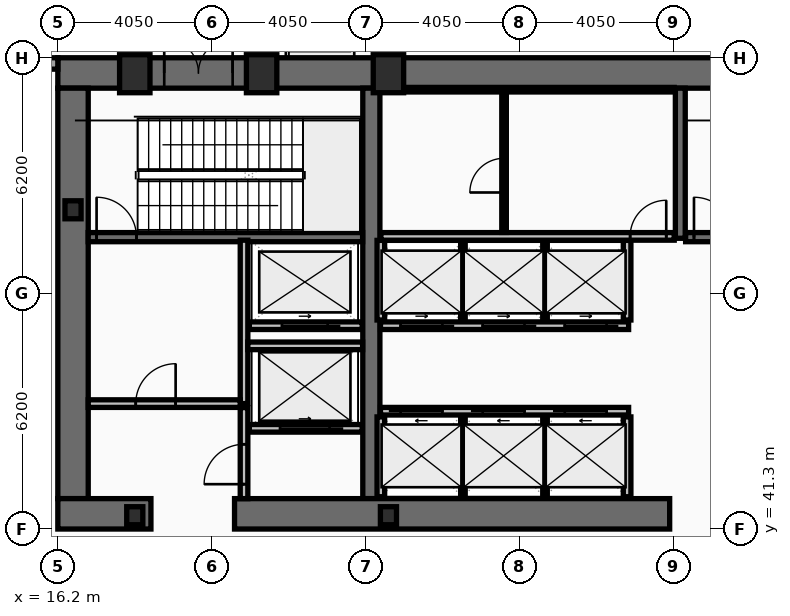
"""IFC4 building model, lengths in metres.
Left out: names, types, materials, properties, quantities, classifications, styles, units other than length and angle.
Written with IfcOpenShell. Run it as: python <this file> out.ifc"""

import sys

from ifc_helpers import new_model, si_unit, direction, frame, frame_2d, origin, origin_2d, place, context, subcontext, project, spatial, rectangle, hollow_rectangle, i_section, extrude, element, fill, save


model = new_model("IFC4")
c1 = context("Model", 3, precision=1e-05, world=origin(), true_north=direction((0.0, 1.0)))
c2 = subcontext(c1, "Body", "Model", "MODEL_VIEW")
j1 = project(units=[si_unit("LENGTHUNIT", "METRE"), si_unit("PLANEANGLEUNIT", "RADIAN")], contexts=[c1])
p1 = place(None, origin())
s1 = spatial("IfcSite", under=j1, at=p1, CompositionType="ELEMENT")
p2 = place(p1, origin())
s2 = spatial("IfcBuilding", under=s1, at=p2, CompositionType="ELEMENT")
p3 = place(p2, origin())
s3 = spatial("IfcBuildingStorey", under=s2, at=p3, CompositionType="ELEMENT", Elevation=0.0)
p4 = place(p3, frame((16.2, 53.3, 0.0), z_axis=(0.0, 0.0, 1.0), x_axis=(1.0, 0.0, 0.0)))
e1 = element("IfcWall", 1, at=p4, inside=s3, PredefinedType="SHEAR", context=c2, shape_type="SweptSolid", body=[
    extrude(rectangle(XDim=40.5, YDim=0.8, at=frame_2d((20.25, 0.0))), origin(), (0.0, 0.0, 1.0), 5.2),
])
p5 = place(p4, frame((2.8, 0.0, 0.0)))
e2 = element("IfcOpeningElement", 2, at=p5, cuts=e1, PredefinedType="OPENING", context=c2, shape_type="SweptSolid", body=[
    extrude(rectangle(XDim=1.8, YDim=2.4, at=frame_2d((0.9, 1.2))), frame((0.0, 0.41, 0.0), z_axis=(0.0, -1.0, 0.0), x_axis=(1.0, 0.0, 0.0)), (0.0, 0.0, 1.0), 0.82),
])
p6 = place(p4, frame((19.3, 0.0, 0.0)))
e3 = element("IfcOpeningElement", 3, at=p6, cuts=e1, PredefinedType="OPENING", context=c2, shape_type="SweptSolid", body=[
    extrude(rectangle(XDim=1.8, YDim=2.4, at=frame_2d((0.9, 1.2))), frame((0.0, 0.41, 0.0), z_axis=(0.0, -1.0, 0.0), x_axis=(1.0, 0.0, 0.0)), (0.0, 0.0, 1.0), 0.82),
])
p7 = place(p4, frame((35.9, 0.0, 0.0)))
e4 = element("IfcOpeningElement", 4, at=p7, cuts=e1, PredefinedType="OPENING", context=c2, shape_type="SweptSolid", body=[
    extrude(rectangle(XDim=1.8, YDim=2.4, at=frame_2d((0.9, 1.2))), frame((0.0, 0.41, 0.0), z_axis=(0.0, -1.0, 0.0), x_axis=(1.0, 0.0, 0.0)), (0.0, 0.0, 1.0), 0.82),
])
p8 = place(p3, frame((16.6, 42.1, 0.0), z_axis=(0.0, 0.0, 1.0), x_axis=(0.0, 1.0, 0.0)))
e5 = element("IfcWall", 5, at=p8, inside=s3, PredefinedType="SHEAR", context=c2, shape_type="SweptSolid", body=[
    extrude(rectangle(XDim=10.8, YDim=0.8, at=frame_2d((5.4, 0.0))), origin(), (0.0, 0.0, 1.0), 5.2),
])
p9 = place(p3, frame((24.45, 42.1, 0.0), z_axis=(0.0, 0.0, 1.0), x_axis=(0.0, 1.0, 0.0)))
e6 = element("IfcWall", 6, at=p9, inside=s3, PredefinedType="SHEAR", context=c2, shape_type="SweptSolid", body=[
    extrude(rectangle(XDim=10.8, YDim=0.45, at=frame_2d((5.4, 0.0))), origin(), (0.0, 0.0, 1.0), 5.2),
])
p10 = place(p3, frame((18.65, 41.7, 0.0), z_axis=(0.0, 0.0, 1.0), x_axis=(-1.0, 0.0, 0.0)))
e7 = element("IfcWall", 7, at=p10, inside=s3, PredefinedType="SHEAR", context=c2, shape_type="SweptSolid", body=[
    extrude(rectangle(XDim=2.45, YDim=0.8, at=frame_2d((1.225, 0.0))), origin(), (0.0, 0.0, 1.0), 5.2),
])
p11 = place(p3, frame((32.3, 41.7, 0.0), z_axis=(0.0, 0.0, 1.0), x_axis=(-1.0, 0.0, 0.0)))
e8 = element("IfcWall", 8, at=p11, inside=s3, PredefinedType="SHEAR", context=c2, shape_type="SweptSolid", body=[
    extrude(rectangle(XDim=11.45, YDim=0.8, at=frame_2d((5.725, 0.0))), origin(), (0.0, 0.0, 1.0), 5.2),
])
p12 = place(p3, frame((32.58, 48.95, 0.0), z_axis=(0.0, 0.0, 1.0), x_axis=(0.0, 1.0, 0.0)))
e9 = element("IfcWall", 9, at=p12, inside=s3, PredefinedType="SHEAR", context=c2, shape_type="SweptSolid", body=[
    extrude(rectangle(XDim=3.95, YDim=0.26, at=frame_2d((1.975, 0.0))), origin(), (0.0, 0.0, 1.0), 5.2),
])
p13 = place(p3, frame((17.0, 48.98, 0.0), z_axis=(0.0, 0.0, 1.0), x_axis=(1.0, 0.0, 0.0)))
e10 = element("IfcWall", 10, at=p13, inside=s3, PredefinedType="SHEAR", context=c2, shape_type="SweptSolid", body=[
    extrude(rectangle(XDim=7.22, YDim=0.24, at=frame_2d((3.61, 0.0))), origin(), (0.0, 0.0, 1.0), 5.2),
])
p14 = place(p13, frame((0.22, 0.0, 0.0)))
e11 = element("IfcOpeningElement", 11, at=p14, cuts=e10, PredefinedType="OPENING", context=c2, shape_type="SweptSolid", body=[
    extrude(rectangle(XDim=1.05, YDim=2.15, at=frame_2d((0.525, 1.075))), frame((0.0, 0.13, 0.0), z_axis=(0.0, -1.0, 0.0), x_axis=(1.0, 0.0, 0.0)), (0.0, 0.0, 1.0), 0.26),
])
p15 = place(p3, frame((32.72, 48.98, 0.0), z_axis=(0.0, 0.0, 1.0), x_axis=(1.0, 0.0, 0.0)))
e12 = element("IfcWall", 12, at=p15, inside=s3, PredefinedType="SHEAR", context=c2, shape_type="SweptSolid", body=[
    extrude(rectangle(XDim=7.56, YDim=0.24, at=frame_2d((3.78, 0.0))), origin(), (0.0, 0.0, 1.0), 5.2),
])
p16 = place(p15, frame((0.22, 0.0, 0.0)))
e13 = element("IfcOpeningElement", 13, at=p16, cuts=e12, PredefinedType="OPENING", context=c2, shape_type="SweptSolid", body=[
    extrude(rectangle(XDim=1.05, YDim=2.15, at=frame_2d((0.525, 1.075))), frame((0.0, 0.13, 0.0), z_axis=(0.0, -1.0, 0.0), x_axis=(1.0, 0.0, 0.0)), (0.0, 0.0, 1.0), 0.26),
])
for number, where, z_axis, x_axis in (
    (14, (18.225, 53.28, 0.0), (0.0, 0.0, 1.0), (1.0, 0.0, 0.0)),
    (15, (21.562, 53.28, 0.0), (0.0, 0.0, 1.0), (1.0, 0.0, 0.0)),
    (16, (24.9, 53.28, 0.0), (0.0, 0.0, 1.0), (1.0, 0.0, 0.0)),
):
    element("IfcColumn", number, at=place(p3, frame(where, z_axis=z_axis, x_axis=x_axis)), inside=s3, PredefinedType="COLUMN", context=c2, shape_type="SweptSolid", body=[
        extrude(hollow_rectangle(XDim=0.8, YDim=1.0, WallThickness=0.055, at=origin_2d()), origin(), (0.0, 0.0, 1.0), 5.4),
    ])
for number, where, z_axis, x_axis in (
    (17, (16.6, 49.7, 0.0), (0.0, 0.0, 1.0), (1.0, 0.0, 0.0)),
    (18, (18.225, 41.65, 0.0), (0.0, 0.0, 1.0), (1.0, 0.0, 0.0)),
    (19, (24.9, 41.65, 0.0), (0.0, 0.0, 1.0), (1.0, 0.0, 0.0)),
):
    element("IfcColumn", number, at=place(p3, frame(where, z_axis=z_axis, x_axis=x_axis)), inside=s3, PredefinedType="COLUMN", context=c2, shape_type="SweptSolid", body=[
        extrude(i_section(OverallWidth=0.424, OverallDepth=0.474, WebThickness=0.048, FlangeThickness=0.077, at=origin_2d()), origin(), (0.0, 0.0, 1.0), 5.4),
    ])
p17 = place(p3, frame((3.875, 53.55, 0.0), z_axis=(0.0, 0.0, 1.0), x_axis=(1.0, 0.0, 0.0)))
e20 = element("IfcWall", 20, at=p17, inside=s3, PredefinedType="SOLIDWALL", context=c2, shape_type="SweptSolid", body=[
    extrude(rectangle(XDim=12.325, YDim=0.3, at=frame_2d((6.163, 0.0))), origin(), (0.0, 0.0, 1.0), 4.54),
])
p18 = place(p17, frame((8.675, 0.0, 0.0)))
e21 = element("IfcOpeningElement", 21, at=p18, cuts=e20, PredefinedType="OPENING", context=c2, shape_type="SweptSolid", body=[
    extrude(rectangle(XDim=1.8, YDim=2.4, at=frame_2d((0.9, 1.2))), frame((0.0, 0.16, 0.0), z_axis=(0.0, -1.0, 0.0), x_axis=(1.0, 0.0, 0.0)), (0.0, 0.0, 1.0), 0.32),
])
p19 = place(p17, frame((2.475, 0.0, 1.0)))
e22 = element("IfcOpeningElement", 22, at=p19, cuts=e20, PredefinedType="OPENING", context=c2, shape_type="SweptSolid", body=[
    extrude(rectangle(XDim=1.2, YDim=2.8, at=frame_2d((0.6, 1.4))), frame((0.0, 0.16, 0.0), z_axis=(0.0, -1.0, 0.0), x_axis=(1.0, 0.0, 0.0)), (0.0, 0.0, 1.0), 0.32),
])
p20 = place(p3, frame((24.69, 44.4, 0.0), z_axis=(0.0, 0.0, 1.0), x_axis=(1.0, 0.0, 0.0)))
e23 = element("IfcWall", 23, at=p20, inside=s3, PredefinedType="PARTITIONING", context=c2, shape_type="SweptSolid", body=[
    extrude(rectangle(XDim=6.53, YDim=0.2, at=frame_2d((3.265, 0.0))), origin(), (0.0, 0.0, 1.0), 5.2),
])
p21 = place(p20, frame((0.53, 0.0, 0.0)))
e24 = element("IfcOpeningElement", 24, at=p21, cuts=e23, PredefinedType="OPENING", context=c2, shape_type="SweptSolid", body=[
    extrude(rectangle(XDim=1.1, YDim=2.18, at=frame_2d((0.55, 1.09))), frame((0.0, 0.11, 0.0), z_axis=(0.0, -1.0, 0.0), x_axis=(1.0, 0.0, 0.0)), (0.0, 0.0, 1.0), 0.22),
])
p22 = place(p20, frame((2.69, 0.0, 0.0)))
e25 = element("IfcOpeningElement", 25, at=p22, cuts=e23, PredefinedType="OPENING", context=c2, shape_type="SweptSolid", body=[
    extrude(rectangle(XDim=1.1, YDim=2.18, at=frame_2d((0.55, 1.09))), frame((0.0, 0.11, 0.0), z_axis=(0.0, -1.0, 0.0), x_axis=(1.0, 0.0, 0.0)), (0.0, 0.0, 1.0), 0.22),
])
p23 = place(p20, frame((4.85, 0.0, 0.0)))
e26 = element("IfcOpeningElement", 26, at=p23, cuts=e23, PredefinedType="OPENING", context=c2, shape_type="SweptSolid", body=[
    extrude(rectangle(XDim=1.1, YDim=2.18, at=frame_2d((0.55, 1.09))), frame((0.0, 0.11, 0.0), z_axis=(0.0, -1.0, 0.0), x_axis=(1.0, 0.0, 0.0)), (0.0, 0.0, 1.0), 0.22),
])
p24 = place(p3, frame((24.21, 43.95, 0.0), z_axis=(0.0, 0.0, 1.0), x_axis=(-1.0, 0.0, 0.0)))
e27 = element("IfcWall", 27, at=p24, inside=s3, PredefinedType="PARTITIONING", context=c2, shape_type="SweptSolid", body=[
    extrude(rectangle(XDim=2.97, YDim=0.2, at=frame_2d((1.485, 0.0))), origin(), (0.0, 0.0, 1.0), 5.2),
])
p25 = place(p24, frame((0.86, 0.0, 0.0)))
e28 = element("IfcOpeningElement", 28, at=p25, cuts=e27, PredefinedType="OPENING", context=c2, shape_type="SweptSolid", body=[
    extrude(rectangle(XDim=1.3, YDim=2.18, at=frame_2d((0.65, 1.09))), frame((0.0, 0.11, 0.0), z_axis=(0.0, -1.0, 0.0), x_axis=(1.0, 0.0, 0.0)), (0.0, 0.0, 1.0), 0.22),
])
p26 = place(p3, frame((24.21, 46.65, 0.0), z_axis=(0.0, 0.0, 1.0), x_axis=(-1.0, 0.0, 0.0)))
e29 = element("IfcWall", 29, at=p26, inside=s3, PredefinedType="PARTITIONING", context=c2, shape_type="SweptSolid", body=[
    extrude(rectangle(XDim=2.97, YDim=0.2, at=frame_2d((1.485, 0.0))), origin(), (0.0, 0.0, 1.0), 5.2),
])
p27 = place(p26, frame((0.91, 0.0, 0.0)))
e30 = element("IfcOpeningElement", 30, at=p27, cuts=e29, PredefinedType="OPENING", context=c2, shape_type="SweptSolid", body=[
    extrude(rectangle(XDim=1.2, YDim=2.18, at=frame_2d((0.6, 1.09))), frame((0.0, 0.11, 0.0), z_axis=(0.0, -1.0, 0.0), x_axis=(1.0, 0.0, 0.0)), (0.0, 0.0, 1.0), 0.22),
])
p28 = place(p3, frame((31.22, 46.65, 0.0), z_axis=(0.0, 0.0, 1.0), x_axis=(-1.0, 0.0, 0.0)))
e31 = element("IfcWall", 31, at=p28, inside=s3, PredefinedType="PARTITIONING", context=c2, shape_type="SweptSolid", body=[
    extrude(rectangle(XDim=6.53, YDim=0.2, at=frame_2d((3.265, 0.0))), origin(), (0.0, 0.0, 1.0), 5.2),
])
p29 = place(p28, frame((4.9, 0.0, 0.0)))
e32 = element("IfcOpeningElement", 32, at=p29, cuts=e31, PredefinedType="OPENING", context=c2, shape_type="SweptSolid", body=[
    extrude(rectangle(XDim=1.1, YDim=2.18, at=frame_2d((0.55, 1.09))), frame((0.0, 0.11, 0.0), z_axis=(0.0, -1.0, 0.0), x_axis=(1.0, 0.0, 0.0)), (0.0, 0.0, 1.0), 0.22),
])
p30 = place(p28, frame((2.74, 0.0, 0.0)))
e33 = element("IfcOpeningElement", 33, at=p30, cuts=e31, PredefinedType="OPENING", context=c2, shape_type="SweptSolid", body=[
    extrude(rectangle(XDim=1.1, YDim=2.18, at=frame_2d((0.55, 1.09))), frame((0.0, 0.11, 0.0), z_axis=(0.0, -1.0, 0.0), x_axis=(1.0, 0.0, 0.0)), (0.0, 0.0, 1.0), 0.22),
])
p31 = place(p28, frame((0.58, 0.0, 0.0)))
e34 = element("IfcOpeningElement", 34, at=p31, cuts=e31, PredefinedType="OPENING", context=c2, shape_type="SweptSolid", body=[
    extrude(rectangle(XDim=1.1, YDim=2.18, at=frame_2d((0.55, 1.09))), frame((0.0, 0.11, 0.0), z_axis=(0.0, -1.0, 0.0), x_axis=(1.0, 0.0, 0.0)), (0.0, 0.0, 1.0), 0.22),
])
p32 = place(p3, frame((21.1, 44.6, 0.0), z_axis=(0.0, 0.0, 1.0), x_axis=(0.0, 1.0, 0.0)))
e35 = element("IfcWall", 35, at=p32, inside=s3, PredefinedType="PARTITIONING", context=c2, shape_type="SweptSolid", body=[
    extrude(rectangle(XDim=4.3, YDim=0.2, at=frame_2d((2.15, 0.0))), origin(), (0.0, 0.0, 1.0), 5.2),
])
p33 = place(p3, frame((17.0, 44.6, 0.0), z_axis=(0.0, 0.0, 1.0), x_axis=(1.0, 0.0, 0.0)))
e36 = element("IfcWall", 36, at=p33, inside=s3, PredefinedType="PARTITIONING", context=c2, shape_type="SweptSolid", body=[
    extrude(rectangle(XDim=4.0, YDim=0.2, at=frame_2d((2.0, 0.0))), origin(), (0.0, 0.0, 1.0), 5.2),
])
p34 = place(p33, frame((1.25, 0.0, 0.0)))
e37 = element("IfcOpeningElement", 37, at=p34, cuts=e36, PredefinedType="OPENING", context=c2, shape_type="SweptSolid", body=[
    extrude(rectangle(XDim=1.05, YDim=2.15, at=frame_2d((0.525, 1.075))), frame((0.0, 0.11, 0.0), z_axis=(0.0, -1.0, 0.0), x_axis=(1.0, 0.0, 0.0)), (0.0, 0.0, 1.0), 0.22),
])
p35 = place(p3, frame((21.2, 46.12, 0.0), z_axis=(0.0, 0.0, 1.0), x_axis=(1.0, 0.0, 0.0)))
e38 = element("IfcWall", 38, at=p35, inside=s3, PredefinedType="PARTITIONING", context=c2, shape_type="SweptSolid", body=[
    extrude(rectangle(XDim=3.02, YDim=0.2, at=frame_2d((1.51, 0.0))), origin(), (0.0, 0.0, 1.0), 5.2),
])
p36 = place(p3, frame((21.1, 42.1, 0.0), z_axis=(0.0, 0.0, 1.0), x_axis=(0.0, 1.0, 0.0)))
e39 = element("IfcWall", 39, at=p36, inside=s3, PredefinedType="PARTITIONING", context=c2, shape_type="SweptSolid", body=[
    extrude(rectangle(XDim=2.395, YDim=0.2, at=frame_2d((1.198, 0.0))), origin(), (0.0, 0.0, 1.0), 5.2),
])
p37 = place(p36, frame((0.38, 0.0, 0.0)))
e40 = element("IfcOpeningElement", 40, at=p37, cuts=e39, PredefinedType="OPENING", context=c2, shape_type="SweptSolid", body=[
    extrude(rectangle(XDim=1.05, YDim=2.15, at=frame_2d((0.525, 1.075))), frame((0.0, 0.11, 0.0), z_axis=(0.0, -1.0, 0.0), x_axis=(1.0, 0.0, 0.0)), (0.0, 0.0, 1.0), 0.22),
])
for number, where, z_axis, x_axis in (
    (41, (24.7, 46.8, 0.0), (0.0, 0.0, 1.0), (0.0, 1.0, 0.0)),
    (42, (31.18, 46.8, 0.0), (0.0, 0.0, 1.0), (0.0, 1.0, 0.0)),
):
    element("IfcWall", number, at=place(p3, frame(where, z_axis=z_axis, x_axis=x_axis)), inside=s3, PredefinedType="PARTITIONING", context=c2, shape_type="SweptSolid", body=[
        extrude(rectangle(XDim=2.095, YDim=0.2, at=frame_2d((1.047, 0.0))), origin(), (0.0, 0.0, 1.0), 5.2),
    ])
for number, where, z_axis, x_axis in (
    (43, (26.86, 46.8, 0.0), (0.0, 0.0, 1.0), (0.0, 1.0, 0.0)),
    (44, (29.02, 46.8, 0.0), (0.0, 0.0, 1.0), (0.0, 1.0, 0.0)),
):
    element("IfcWall", number, at=place(p3, frame(where, z_axis=z_axis, x_axis=x_axis)), inside=s3, PredefinedType="PARTITIONING", context=c2, shape_type="SweptSolid", body=[
        extrude(rectangle(XDim=2.095, YDim=0.12, at=frame_2d((1.047, 0.0))), origin(), (0.0, 0.0, 1.0), 5.2),
    ])
for number, where, z_axis, x_axis in (
    (45, (24.7, 42.15, 0.0), (0.0, 0.0, 1.0), (0.0, 1.0, 0.0)),
    (46, (31.18, 42.15, 0.0), (0.0, 0.0, 1.0), (0.0, 1.0, 0.0)),
):
    element("IfcWall", number, at=place(p3, frame(where, z_axis=z_axis, x_axis=x_axis)), inside=s3, PredefinedType="PARTITIONING", context=c2, shape_type="SweptSolid", body=[
        extrude(rectangle(XDim=2.1, YDim=0.2, at=frame_2d((1.05, 0.0))), origin(), (0.0, 0.0, 1.0), 5.2),
    ])
for number, where, z_axis, x_axis in (
    (47, (26.86, 42.15, 0.0), (0.0, 0.0, 1.0), (0.0, 1.0, 0.0)),
    (48, (29.02, 42.15, 0.0), (0.0, 0.0, 1.0), (0.0, 1.0, 0.0)),
):
    element("IfcWall", number, at=place(p3, frame(where, z_axis=z_axis, x_axis=x_axis)), inside=s3, PredefinedType="PARTITIONING", context=c2, shape_type="SweptSolid", body=[
        extrude(rectangle(XDim=2.1, YDim=0.12, at=frame_2d((1.05, 0.0))), origin(), (0.0, 0.0, 1.0), 5.2),
    ])
p38 = place(p3, frame((24.7, 52.86, 0.0), z_axis=(0.0, 0.0, 1.0), x_axis=(1.0, 0.0, 0.0)))
e49 = element("IfcWall", 49, at=p38, inside=s3, PredefinedType="PARTITIONING", context=c2, shape_type="SweptSolid", body=[
    extrude(rectangle(XDim=7.72, YDim=0.12, at=frame_2d((3.86, 0.0))), origin(), (0.0, 0.0, 1.0), 5.2),
])
p39 = place(p3, frame((24.7, 49.0, 0.0), z_axis=(0.0, 0.0, 1.0), x_axis=(1.0, 0.0, 0.0)))
e50 = element("IfcWall", 50, at=p39, inside=s3, PredefinedType="PARTITIONING", context=c2, shape_type="SweptSolid", body=[
    extrude(rectangle(XDim=7.72, YDim=0.2, at=frame_2d((3.86, 0.0))), origin(), (0.0, 0.0, 1.0), 5.2),
])
p40 = place(p39, frame((6.56, 0.0, 0.0)))
e51 = element("IfcOpeningElement", 51, at=p40, cuts=e50, PredefinedType="OPENING", context=c2, shape_type="SweptSolid", body=[
    extrude(rectangle(XDim=0.95, YDim=2.1, at=frame_2d((0.475, 1.05))), frame((0.0, 0.11, 0.0), z_axis=(0.0, -1.0, 0.0), x_axis=(1.0, 0.0, 0.0)), (0.0, 0.0, 1.0), 0.22),
])
p41 = place(p3, frame((27.942, 49.105, 0.0), z_axis=(0.0, 0.0, 1.0), x_axis=(0.0, 1.0, 0.0)))
e52 = element("IfcWall", 52, at=p41, inside=s3, PredefinedType="PARTITIONING", context=c2, shape_type="SweptSolid", body=[
    extrude(rectangle(XDim=3.69, YDim=0.12, at=frame_2d((1.845, 0.0))), origin(), (0.0, 0.0, 1.0), 5.2),
])
p42 = place(p41, frame((1.05, 0.0, 0.0)))
e53 = element("IfcOpeningElement", 53, at=p42, cuts=e52, PredefinedType="OPENING", context=c2, shape_type="SweptSolid", body=[
    extrude(rectangle(XDim=0.9, YDim=2.05, at=frame_2d((0.45, 1.025))), frame((0.0, 0.07, 0.0), z_axis=(0.0, -1.0, 0.0), x_axis=(1.0, 0.0, 0.0)), (0.0, 0.0, 1.0), 0.14),
])
p43 = place(p5, origin())
e54 = element("IfcDoor", 54, at=p43, inside=s3, OperationType="DOUBLE_DOOR_SINGLE_SWING", PredefinedType="DOOR", context=c2, shape_type="SweptSolid", body=[
    extrude(rectangle(XDim=1.8, YDim=2.4, at=frame_2d((0.9, 1.2))), frame((0.0, 0.025, 0.0), z_axis=(0.0, -1.0, 0.0), x_axis=(1.0, 0.0, 0.0)), (0.0, 0.0, 1.0), 0.05),
])
fill(e2, e54)
p44 = place(p14, origin())
e55 = element("IfcDoor", 55, at=p44, inside=s3, OperationType="SINGLE_SWING_LEFT", PredefinedType="DOOR", context=c2, shape_type="SweptSolid", body=[
    extrude(rectangle(XDim=1.05, YDim=2.15, at=frame_2d((0.525, 1.075))), frame((0.0, 0.025, 0.0), z_axis=(0.0, -1.0, 0.0), x_axis=(1.0, 0.0, 0.0)), (0.0, 0.0, 1.0), 0.05),
])
fill(e11, e55)
p45 = place(p16, origin())
e56 = element("IfcDoor", 56, at=p45, inside=s3, OperationType="SINGLE_SWING_LEFT", PredefinedType="DOOR", context=c2, shape_type="SweptSolid", body=[
    extrude(rectangle(XDim=1.05, YDim=2.15, at=frame_2d((0.525, 1.075))), frame((0.0, 0.025, 0.0), z_axis=(0.0, -1.0, 0.0), x_axis=(1.0, 0.0, 0.0)), (0.0, 0.0, 1.0), 0.05),
])
fill(e13, e56)
p46 = place(p21, origin())
e57 = element("IfcDoor", 57, at=p46, inside=s3, OperationType="SLIDING_TO_LEFT", PredefinedType="DOOR", context=c2, shape_type="SweptSolid", body=[
    extrude(rectangle(XDim=1.1, YDim=2.18, at=frame_2d((0.55, 1.09))), frame((0.0, 0.025, 0.0), z_axis=(0.0, -1.0, 0.0), x_axis=(1.0, 0.0, 0.0)), (0.0, 0.0, 1.0), 0.05),
])
fill(e24, e57)
p47 = place(p22, origin())
e58 = element("IfcDoor", 58, at=p47, inside=s3, OperationType="SLIDING_TO_LEFT", PredefinedType="DOOR", context=c2, shape_type="SweptSolid", body=[
    extrude(rectangle(XDim=1.1, YDim=2.18, at=frame_2d((0.55, 1.09))), frame((0.0, 0.025, 0.0), z_axis=(0.0, -1.0, 0.0), x_axis=(1.0, 0.0, 0.0)), (0.0, 0.0, 1.0), 0.05),
])
fill(e25, e58)
p48 = place(p23, origin())
e59 = element("IfcDoor", 59, at=p48, inside=s3, OperationType="SLIDING_TO_LEFT", PredefinedType="DOOR", context=c2, shape_type="SweptSolid", body=[
    extrude(rectangle(XDim=1.1, YDim=2.18, at=frame_2d((0.55, 1.09))), frame((0.0, 0.025, 0.0), z_axis=(0.0, -1.0, 0.0), x_axis=(1.0, 0.0, 0.0)), (0.0, 0.0, 1.0), 0.05),
])
fill(e26, e59)
p49 = place(p25, origin())
e60 = element("IfcDoor", 60, at=p49, inside=s3, OperationType="SLIDING_TO_LEFT", PredefinedType="DOOR", context=c2, shape_type="SweptSolid", body=[
    extrude(rectangle(XDim=1.3, YDim=2.18, at=frame_2d((0.65, 1.09))), frame((0.0, 0.025, 0.0), z_axis=(0.0, -1.0, 0.0), x_axis=(1.0, 0.0, 0.0)), (0.0, 0.0, 1.0), 0.05),
])
fill(e28, e60)
p50 = place(p27, origin())
e61 = element("IfcDoor", 61, at=p50, inside=s3, OperationType="SLIDING_TO_LEFT", PredefinedType="DOOR", context=c2, shape_type="SweptSolid", body=[
    extrude(rectangle(XDim=1.2, YDim=2.18, at=frame_2d((0.6, 1.09))), frame((0.0, 0.025, 0.0), z_axis=(0.0, -1.0, 0.0), x_axis=(1.0, 0.0, 0.0)), (0.0, 0.0, 1.0), 0.05),
])
fill(e30, e61)
p51 = place(p29, origin())
e62 = element("IfcDoor", 62, at=p51, inside=s3, OperationType="SLIDING_TO_LEFT", PredefinedType="DOOR", context=c2, shape_type="SweptSolid", body=[
    extrude(rectangle(XDim=1.1, YDim=2.18, at=frame_2d((0.55, 1.09))), frame((0.0, 0.025, 0.0), z_axis=(0.0, -1.0, 0.0), x_axis=(1.0, 0.0, 0.0)), (0.0, 0.0, 1.0), 0.05),
])
fill(e32, e62)
p52 = place(p30, origin())
e63 = element("IfcDoor", 63, at=p52, inside=s3, OperationType="SLIDING_TO_LEFT", PredefinedType="DOOR", context=c2, shape_type="SweptSolid", body=[
    extrude(rectangle(XDim=1.1, YDim=2.18, at=frame_2d((0.55, 1.09))), frame((0.0, 0.025, 0.0), z_axis=(0.0, -1.0, 0.0), x_axis=(1.0, 0.0, 0.0)), (0.0, 0.0, 1.0), 0.05),
])
fill(e33, e63)
p53 = place(p31, origin())
e64 = element("IfcDoor", 64, at=p53, inside=s3, OperationType="SLIDING_TO_LEFT", PredefinedType="DOOR", context=c2, shape_type="SweptSolid", body=[
    extrude(rectangle(XDim=1.1, YDim=2.18, at=frame_2d((0.55, 1.09))), frame((0.0, 0.025, 0.0), z_axis=(0.0, -1.0, 0.0), x_axis=(1.0, 0.0, 0.0)), (0.0, 0.0, 1.0), 0.05),
])
fill(e34, e64)
p54 = place(p34, origin())
e65 = element("IfcDoor", 65, at=p54, inside=s3, OperationType="SINGLE_SWING_RIGHT", PredefinedType="DOOR", context=c2, shape_type="SweptSolid", body=[
    extrude(rectangle(XDim=1.05, YDim=2.15, at=frame_2d((0.525, 1.075))), frame((0.0, 0.025, 0.0), z_axis=(0.0, -1.0, 0.0), x_axis=(1.0, 0.0, 0.0)), (0.0, 0.0, 1.0), 0.05),
])
fill(e37, e65)
p55 = place(p37, origin())
e66 = element("IfcDoor", 66, at=p55, inside=s3, OperationType="SINGLE_SWING_LEFT", PredefinedType="DOOR", context=c2, shape_type="SweptSolid", body=[
    extrude(rectangle(XDim=1.05, YDim=2.15, at=frame_2d((0.525, 1.075))), frame((0.0, 0.025, 0.0), z_axis=(0.0, -1.0, 0.0), x_axis=(1.0, 0.0, 0.0)), (0.0, 0.0, 1.0), 0.05),
])
fill(e40, e66)
p56 = place(p40, origin())
e67 = element("IfcDoor", 67, at=p56, inside=s3, OperationType="SINGLE_SWING_RIGHT", PredefinedType="DOOR", context=c2, shape_type="SweptSolid", body=[
    extrude(rectangle(XDim=0.95, YDim=2.1, at=frame_2d((0.475, 1.05))), frame((0.0, 0.025, 0.0), z_axis=(0.0, -1.0, 0.0), x_axis=(1.0, 0.0, 0.0)), (0.0, 0.0, 1.0), 0.05),
])
fill(e51, e67)
p57 = place(p42, origin())
e68 = element("IfcDoor", 68, at=p57, inside=s3, OperationType="SINGLE_SWING_LEFT", PredefinedType="DOOR", context=c2, shape_type="SweptSolid", body=[
    extrude(rectangle(XDim=0.9, YDim=2.05, at=frame_2d((0.45, 1.025))), frame((0.0, 0.025, 0.0), z_axis=(0.0, -1.0, 0.0), x_axis=(1.0, 0.0, 0.0)), (0.0, 0.0, 1.0), 0.05),
])
fill(e53, e68)
save(model, sys.argv[1])
